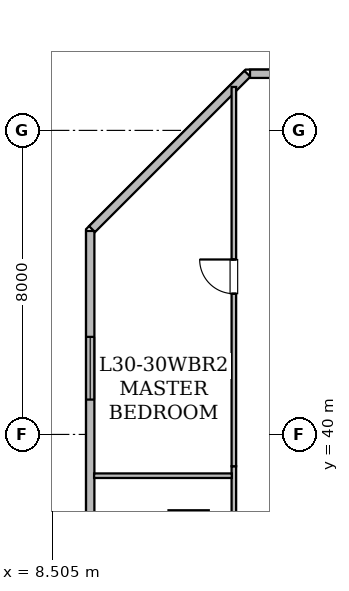
"""IFC4 building model, lengths in metres.
Left out: names, types, materials, properties, quantities, classifications, styles, units other than length and angle.
Written with IfcOpenShell. Run it as: python <this file> out.ifc"""

import sys

from ifc_helpers import new_model, si_unit, direction, frame, frame_2d, origin, place, context, subcontext, project, spatial, rectangle, extrude, element, fill, save


model = new_model("IFC4")
c1 = context("Model", 3, precision=1e-05, world=origin(), true_north=direction((0.0, 1.0)))
c2 = subcontext(c1, "Body", "Model", "MODEL_VIEW")
j1 = project(units=[si_unit("LENGTHUNIT", "METRE"), si_unit("PLANEANGLEUNIT", "RADIAN")], contexts=[c1])
p1 = place(None, origin())
s1 = spatial("IfcSite", under=j1, at=p1, CompositionType="ELEMENT")
p2 = place(p1, origin())
s2 = spatial("IfcBuilding", under=s1, at=p2, CompositionType="ELEMENT")
p3 = place(p2, frame((0.0, 0.0, 120.15)))
s3 = spatial("IfcBuildingStorey", under=s2, at=p3, CompositionType="ELEMENT", Elevation=120.15)
p4 = place(p3, frame((9.51, 31.293, 0.0), z_axis=(0.0, 0.0, 1.0), x_axis=(0.0, 1.0, 0.0)))
e1 = element("IfcWall", 1, at=p4, inside=s3, PredefinedType="STANDARD", context=c2, shape_type="SweptSolid", body=[
    extrude(rectangle(XDim=14.061, YDim=0.22, at=frame_2d((7.031, 0.0))), origin(), (0.0, 0.0, 1.0), 3.43),
])
p5 = place(p4, frame((3.378, 0.0, 0.85)))
e2 = element("IfcOpeningElement", 2, at=p5, cuts=e1, PredefinedType="OPENING", context=c2, shape_type="SweptSolid", body=[
    extrude(rectangle(XDim=1.65, YDim=1.55, at=frame_2d((0.825, 0.775))), frame((0.0, 0.12, 0.0), z_axis=(0.0, -1.0, 0.0), x_axis=(1.0, 0.0, 0.0)), (0.0, 0.0, 1.0), 0.24),
])
p6 = place(p4, frame((9.624, 0.0, 0.85)))
e3 = element("IfcOpeningElement", 3, at=p6, cuts=e1, PredefinedType="OPENING", context=c2, shape_type="SweptSolid", body=[
    extrude(rectangle(XDim=1.65, YDim=1.55, at=frame_2d((0.825, 0.775))), frame((0.0, 0.12, 0.0), z_axis=(0.0, -1.0, 0.0), x_axis=(1.0, 0.0, 0.0)), (0.0, 0.0, 1.0), 0.24),
])
p7 = place(p3, frame((9.558, 45.402, 0.0), z_axis=(0.0, 0.0, 1.0), x_axis=(0.707106781187, 0.707106781187, 0.0)))
e4 = element("IfcWall", 4, at=p7, inside=s3, PredefinedType="STANDARD", context=c2, shape_type="SweptSolid", body=[
    extrude(rectangle(XDim=5.781, YDim=0.22, at=frame_2d((2.891, 0.0))), origin(), (0.0, 0.0, 1.0), 3.43),
])
p8 = place(p3, frame((13.715, 49.49, 0.0), z_axis=(0.0, 0.0, 1.0), x_axis=(1.0, 0.0, 0.0)))
e5 = element("IfcWall", 5, at=p8, inside=s3, PredefinedType="STANDARD", context=c2, shape_type="SweptSolid", body=[
    extrude(rectangle(XDim=38.639, YDim=0.22, at=frame_2d((19.319, 0.0))), origin(), (0.0, 0.0, 1.0), 3.43),
])
p9 = place(p8, frame((16.16, 0.0, 0.85)))
e6 = element("IfcOpeningElement", 6, at=p9, cuts=e5, PredefinedType="OPENING", context=c2, shape_type="SweptSolid", body=[
    extrude(rectangle(XDim=1.65, YDim=1.55, at=frame_2d((0.825, 0.775))), frame((0.0, 0.12, 0.0), z_axis=(0.0, -1.0, 0.0), x_axis=(1.0, 0.0, 0.0)), (0.0, 0.0, 1.0), 0.24),
])
p10 = place(p8, frame((2.243, 0.0, 0.85)))
e7 = element("IfcOpeningElement", 7, at=p10, cuts=e5, PredefinedType="OPENING", context=c2, shape_type="SweptSolid", body=[
    extrude(rectangle(XDim=1.65, YDim=1.55, at=frame_2d((0.825, 0.775))), frame((0.0, 0.12, 0.0), z_axis=(0.0, -1.0, 0.0), x_axis=(1.0, 0.0, 0.0)), (0.0, 0.0, 1.0), 0.24),
])
p11 = place(p8, frame((11.03, 0.0, 0.85)))
e8 = element("IfcOpeningElement", 8, at=p11, cuts=e5, PredefinedType="OPENING", context=c2, shape_type="SweptSolid", body=[
    extrude(rectangle(XDim=1.65, YDim=1.55, at=frame_2d((0.825, 0.775))), frame((0.0, 0.12, 0.0), z_axis=(0.0, -1.0, 0.0), x_axis=(1.0, 0.0, 0.0)), (0.0, 0.0, 1.0), 0.24),
])
p12 = place(p8, frame((9.2, 0.0, 0.8)))
e9 = element("IfcOpeningElement", 9, at=p12, cuts=e5, PredefinedType="OPENING", context=c2, shape_type="SweptSolid", body=[
    extrude(rectangle(XDim=1.2, YDim=1.5, at=frame_2d((0.6, 0.75))), frame((0.0, 0.12, 0.0), z_axis=(0.0, -1.0, 0.0), x_axis=(1.0, 0.0, 0.0)), (0.0, 0.0, 1.0), 0.24),
])
p13 = place(p8, frame((6.175, 0.0, 0.85)))
e10 = element("IfcOpeningElement", 10, at=p13, cuts=e5, PredefinedType="OPENING", context=c2, shape_type="SweptSolid", body=[
    extrude(rectangle(XDim=1.65, YDim=1.55, at=frame_2d((0.825, 0.775))), frame((0.0, 0.12, 0.0), z_axis=(0.0, -1.0, 0.0), x_axis=(1.0, 0.0, 0.0)), (0.0, 0.0, 1.0), 0.24),
])
p14 = place(p8, frame((23.425, 0.0, 0.85)))
e11 = element("IfcOpeningElement", 11, at=p14, cuts=e5, PredefinedType="OPENING", context=c2, shape_type="SweptSolid", body=[
    extrude(rectangle(XDim=1.65, YDim=1.55, at=frame_2d((0.825, 0.775))), frame((0.0, 0.12, 0.0), z_axis=(0.0, -1.0, 0.0), x_axis=(1.0, 0.0, 0.0)), (0.0, 0.0, 1.0), 0.24),
])
p15 = place(p8, frame((30.23, 0.0, 0.85)))
e12 = element("IfcOpeningElement", 12, at=p15, cuts=e5, PredefinedType="OPENING", context=c2, shape_type="SweptSolid", body=[
    extrude(rectangle(XDim=1.65, YDim=1.55, at=frame_2d((0.825, 0.775))), frame((0.0, 0.12, 0.0), z_axis=(0.0, -1.0, 0.0), x_axis=(1.0, 0.0, 0.0)), (0.0, 0.0, 1.0), 0.24),
])
p16 = place(p8, frame((36.367, 0.0, 0.85)))
e13 = element("IfcOpeningElement", 13, at=p16, cuts=e5, PredefinedType="OPENING", context=c2, shape_type="SweptSolid", body=[
    extrude(rectangle(XDim=1.65, YDim=1.55, at=frame_2d((0.825, 0.775))), frame((0.0, 0.12, 0.0), z_axis=(0.0, -1.0, 0.0), x_axis=(1.0, 0.0, 0.0)), (0.0, 0.0, 1.0), 0.24),
])
p17 = place(p3, frame((13.29, 31.61, 0.0), z_axis=(0.0, 0.0, 1.0), x_axis=(0.0, 1.0, 0.0)))
e14 = element("IfcWall", 14, at=p17, inside=s3, PredefinedType="PARTITIONING", context=c2, shape_type="SweptSolid", body=[
    extrude(rectangle(XDim=7.553, YDim=0.12, at=frame_2d((3.776, 0.0))), origin(), (0.0, 0.0, 1.0), 2.687),
])
p18 = place(p17, frame((3.305, 0.0, 0.0)))
e15 = element("IfcOpeningElement", 15, at=p18, cuts=e14, PredefinedType="OPENING", context=c2, shape_type="SweptSolid", body=[
    extrude(rectangle(XDim=0.9, YDim=2.1, at=frame_2d((0.45, 1.05))), frame((0.0, 0.07, 0.0), z_axis=(0.0, -1.0, 0.0), x_axis=(1.0, 0.0, 0.0)), (0.0, 0.0, 1.0), 0.14),
])
p19 = place(p3, frame((13.29, 39.163, 0.0), z_axis=(0.0, 0.0, 1.0), x_axis=(0.0, 1.0, 0.0)))
e16 = element("IfcWall", 16, at=p19, inside=s3, PredefinedType="PARTITIONING", context=c2, shape_type="SweptSolid", body=[
    extrude(rectangle(XDim=9.98, YDim=0.12, at=frame_2d((4.99, 0.0))), origin(), (0.0, 0.0, 1.0), 2.876),
])
p20 = place(p19, frame((4.54, 0.0, 0.0)))
e17 = element("IfcOpeningElement", 17, at=p20, cuts=e16, PredefinedType="OPENING", context=c2, shape_type="SweptSolid", body=[
    extrude(rectangle(XDim=0.9, YDim=2.1, at=frame_2d((0.45, 1.05))), frame((0.0, 0.07, 0.0), z_axis=(0.0, -1.0, 0.0), x_axis=(1.0, 0.0, 0.0)), (0.0, 0.0, 1.0), 0.14),
])
p21 = place(p3, frame((9.612, 38.914, 0.0), z_axis=(0.0, 0.0, 1.0), x_axis=(1.0, 0.0, 0.0)))
e18 = element("IfcWall", 18, at=p21, inside=s3, PredefinedType="PARTITIONING", context=c2, shape_type="SweptSolid", body=[
    extrude(rectangle(XDim=3.624, YDim=0.12, at=frame_2d((1.812, 0.0))), origin(), (0.0, 0.0, 1.0), 2.876),
])
p22 = place(p6, origin())
e19 = element("IfcWindow", 19, at=p22, inside=s3, PartitioningType="SINGLE_PANEL", PredefinedType="WINDOW", context=c2, shape_type="SweptSolid", body=[
    extrude(rectangle(XDim=1.65, YDim=1.55, at=frame_2d((0.825, 0.775))), frame((0.0, 0.03, 0.0), z_axis=(0.0, -1.0, 0.0), x_axis=(1.0, 0.0, 0.0)), (0.0, 0.0, 1.0), 0.06),
])
fill(e3, e19)
p23 = place(p20, origin())
e20 = element("IfcDoor", 20, at=p23, inside=s3, OperationType="SINGLE_SWING_RIGHT", PredefinedType="DOOR", context=c2, shape_type="SweptSolid", body=[
    extrude(rectangle(XDim=0.9, YDim=2.1, at=frame_2d((0.45, 1.05))), frame((0.0, 0.025, 0.0), z_axis=(0.0, -1.0, 0.0), x_axis=(1.0, 0.0, 0.0)), (0.0, 0.0, 1.0), 0.05),
])
fill(e17, e20)
save(model, sys.argv[1])
